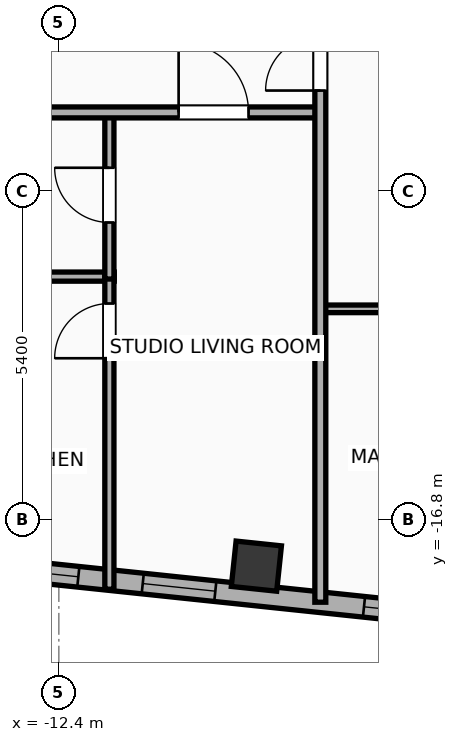
"""IFC4 building model, lengths in metres.
Left out: names, types, materials, properties, quantities, classifications, styles, units other than length and angle.
Written with IfcOpenShell. Run it as: python <this file> out.ifc"""

import sys

from ifc_helpers import new_model, si_unit, direction, frame, frame_2d, origin, origin_2d, place, context, subcontext, project, spatial, rectangle, hollow_rectangle, extrude, element, fill, save


model = new_model("IFC4")
c1 = context("Model", 3, precision=1e-05, world=origin(), true_north=direction((0.0, 1.0)))
c2 = subcontext(c1, "Body", "Model", "MODEL_VIEW")
j1 = project(units=[si_unit("LENGTHUNIT", "METRE"), si_unit("PLANEANGLEUNIT", "RADIAN")], contexts=[c1])
p1 = place(None, origin())
s1 = spatial("IfcSite", under=j1, at=p1, CompositionType="ELEMENT")
p2 = place(p1, origin())
s2 = spatial("IfcBuilding", under=s1, at=p2, CompositionType="ELEMENT")
p3 = place(p2, frame((0.0, 0.0, 271.7)))
s3 = spatial("IfcBuildingStorey", under=s2, at=p3, CompositionType="ELEMENT", Elevation=271.7)
p4 = place(p3, frame((-9.152, -17.561, 0.0), z_axis=(0.0, 0.0, 1.0), x_axis=(0.994521895368, -0.104528463268, 0.0)))
e1 = element("IfcColumn", 1, at=p4, inside=s3, PredefinedType="COLUMN", context=c2, shape_type="SweptSolid", body=[
    extrude(hollow_rectangle(XDim=0.75, YDim=0.75, WallThickness=0.025, at=origin_2d()), origin(), (0.0, 0.0, 1.0), 3.9),
])
p5 = place(p3, frame((18.708, -20.972, 0.0), z_axis=(0.0, 0.0, 1.0), x_axis=(-0.994521888554, 0.104528528102, 0.0)))
e2 = element("IfcWall", 2, at=p5, inside=s3, PredefinedType="ELEMENTEDWALL", context=c2, shape_type="SweptSolid", body=[
    extrude(rectangle(XDim=46.766, YDim=0.34, at=frame_2d((23.383, 0.0))), origin(), (0.0, 0.0, 1.0), 3.65),
])
p6 = place(p5, frame((23.833, 0.0, 0.75)))
e3 = element("IfcOpeningElement", 3, at=p6, cuts=e2, PredefinedType="OPENING", context=c2, shape_type="SweptSolid", body=[
    extrude(rectangle(XDim=2.4, YDim=2.1, at=frame_2d((1.2, 1.05))), frame((0.0, 0.18, 0.0), z_axis=(0.0, -1.0, 0.0), x_axis=(1.0, 0.0, 0.0)), (0.0, 0.0, 1.0), 0.36),
])
p7 = place(p5, frame((38.622, 0.0, 0.75)))
e4 = element("IfcOpeningElement", 4, at=p7, cuts=e2, PredefinedType="OPENING", context=c2, shape_type="SweptSolid", body=[
    extrude(rectangle(XDim=2.4, YDim=2.1, at=frame_2d((1.2, 1.05))), frame((0.0, 0.18, 0.0), z_axis=(0.0, -1.0, 0.0), x_axis=(1.0, 0.0, 0.0)), (0.0, 0.0, 1.0), 0.36),
])
p8 = place(p5, frame((44.402, 0.0, 0.75)))
e5 = element("IfcOpeningElement", 5, at=p8, cuts=e2, PredefinedType="OPENING", context=c2, shape_type="SweptSolid", body=[
    extrude(rectangle(XDim=1.2, YDim=2.05, at=frame_2d((0.6, 1.025))), frame((0.0, 0.18, 0.0), z_axis=(0.0, -1.0, 0.0), x_axis=(1.0, 0.0, 0.0)), (0.0, 0.0, 1.0), 0.36),
])
p9 = place(p5, frame((42.419, 0.0, 0.75)))
e6 = element("IfcOpeningElement", 6, at=p9, cuts=e2, PredefinedType="OPENING", context=c2, shape_type="SweptSolid", body=[
    extrude(rectangle(XDim=1.2, YDim=2.05, at=frame_2d((0.6, 1.025))), frame((0.0, 0.18, 0.0), z_axis=(0.0, -1.0, 0.0), x_axis=(1.0, 0.0, 0.0)), (0.0, 0.0, 1.0), 0.36),
])
p10 = place(p5, frame((34.933, 0.0, 0.75)))
e7 = element("IfcOpeningElement", 7, at=p10, cuts=e2, PredefinedType="OPENING", context=c2, shape_type="SweptSolid", body=[
    extrude(rectangle(XDim=1.2, YDim=2.05, at=frame_2d((0.6, 1.025))), frame((0.0, 0.18, 0.0), z_axis=(0.0, -1.0, 0.0), x_axis=(1.0, 0.0, 0.0)), (0.0, 0.0, 1.0), 0.36),
])
p11 = place(p5, frame((28.692, 0.0, 0.75)))
e8 = element("IfcOpeningElement", 8, at=p11, cuts=e2, PredefinedType="OPENING", context=c2, shape_type="SweptSolid", body=[
    extrude(rectangle(XDim=1.2, YDim=2.05, at=frame_2d((0.6, 1.025))), frame((0.0, 0.18, 0.0), z_axis=(0.0, -1.0, 0.0), x_axis=(1.0, 0.0, 0.0)), (0.0, 0.0, 1.0), 0.36),
])
p12 = place(p5, frame((30.957, 0.0, 0.75)))
e9 = element("IfcOpeningElement", 9, at=p12, cuts=e2, PredefinedType="OPENING", context=c2, shape_type="SweptSolid", body=[
    extrude(rectangle(XDim=1.2, YDim=2.05, at=frame_2d((0.6, 1.025))), frame((0.0, 0.18, 0.0), z_axis=(0.0, -1.0, 0.0), x_axis=(1.0, 0.0, 0.0)), (0.0, 0.0, 1.0), 0.36),
])
p13 = place(p5, frame((7.492, 0.0, 0.75)))
e10 = element("IfcOpeningElement", 10, at=p13, cuts=e2, PredefinedType="OPENING", context=c2, shape_type="SweptSolid", body=[
    extrude(rectangle(XDim=1.2, YDim=2.05, at=frame_2d((0.6, 1.025))), frame((0.0, 0.18, 0.0), z_axis=(0.0, -1.0, 0.0), x_axis=(1.0, 0.0, 0.0)), (0.0, 0.0, 1.0), 0.36),
])
p14 = place(p5, frame((4.141, 0.0, 0.75)))
e11 = element("IfcOpeningElement", 11, at=p14, cuts=e2, PredefinedType="OPENING", context=c2, shape_type="SweptSolid", body=[
    extrude(rectangle(XDim=1.2, YDim=2.05, at=frame_2d((0.6, 1.025))), frame((0.0, 0.18, 0.0), z_axis=(0.0, -1.0, 0.0), x_axis=(1.0, 0.0, 0.0)), (0.0, 0.0, 1.0), 0.36),
])
p15 = place(p5, frame((1.36, 0.0, 0.75)))
e12 = element("IfcOpeningElement", 12, at=p15, cuts=e2, PredefinedType="OPENING", context=c2, shape_type="SweptSolid", body=[
    extrude(rectangle(XDim=1.2, YDim=2.05, at=frame_2d((0.6, 1.025))), frame((0.0, 0.18, 0.0), z_axis=(0.0, -1.0, 0.0), x_axis=(1.0, 0.0, 0.0)), (0.0, 0.0, 1.0), 0.36),
])
p16 = place(p5, frame((20.254, 0.0, 0.75)))
e13 = element("IfcOpeningElement", 13, at=p16, cuts=e2, PredefinedType="OPENING", context=c2, shape_type="SweptSolid", body=[
    extrude(rectangle(XDim=1.2, YDim=2.05, at=frame_2d((0.6, 1.025))), frame((0.0, 0.18, 0.0), z_axis=(0.0, -1.0, 0.0), x_axis=(1.0, 0.0, 0.0)), (0.0, 0.0, 1.0), 0.36),
])
p17 = place(p5, frame((16.172, 0.0, 0.75)))
e14 = element("IfcOpeningElement", 14, at=p17, cuts=e2, PredefinedType="OPENING", context=c2, shape_type="SweptSolid", body=[
    extrude(rectangle(XDim=1.2, YDim=2.05, at=frame_2d((0.6, 1.025))), frame((0.0, 0.18, 0.0), z_axis=(0.0, -1.0, 0.0), x_axis=(1.0, 0.0, 0.0)), (0.0, 0.0, 1.0), 0.36),
])
p18 = place(p5, frame((12.11, 0.0, 0.75)))
e15 = element("IfcOpeningElement", 15, at=p18, cuts=e2, PredefinedType="OPENING", context=c2, shape_type="SweptSolid", body=[
    extrude(rectangle(XDim=1.2, YDim=2.05, at=frame_2d((0.6, 1.025))), frame((0.0, 0.18, 0.0), z_axis=(0.0, -1.0, 0.0), x_axis=(1.0, 0.0, 0.0)), (0.0, 0.0, 1.0), 0.36),
])
p19 = place(p3, frame((-14.039, -12.8, 0.0), z_axis=(0.0, 0.0, 1.0), x_axis=(1.0, 0.0, 0.0)))
e16 = element("IfcWall", 16, at=p19, inside=s3, PredefinedType="PLUMBINGWALL", context=c2, shape_type="SweptSolid", body=[
    extrude(rectangle(XDim=2.55, YDim=0.15, at=frame_2d((1.275, 0.0))), origin(), (0.0, 0.0, 1.0), 3.65),
])
p20 = place(p3, frame((-11.569, -17.941, 0.0), z_axis=(0.0, 0.0, 1.0), x_axis=(0.0, 1.0, 0.0)))
e17 = element("IfcWall", 17, at=p20, inside=s3, PredefinedType="PLUMBINGWALL", context=c2, shape_type="SweptSolid", body=[
    extrude(rectangle(XDim=5.181, YDim=0.15, at=frame_2d((2.59, 0.0))), origin(), (0.0, 0.0, 1.0), 3.65),
])
p21 = place(p20, frame((3.798, 0.0, 0.0)))
e18 = element("IfcOpeningElement", 18, at=p21, cuts=e17, PredefinedType="OPENING", context=c2, shape_type="SweptSolid", body=[
    extrude(rectangle(XDim=0.9, YDim=2.05, at=frame_2d((0.45, 1.025))), frame((0.0, 0.085, 0.0), z_axis=(0.0, -1.0, 0.0), x_axis=(1.0, 0.0, 0.0)), (0.0, 0.0, 1.0), 0.17),
])
p22 = place(p3, frame((-11.569, -12.84, 0.0), z_axis=(0.0, 0.0, 1.0), x_axis=(0.0, 1.0, 0.0)))
e19 = element("IfcWall", 19, at=p22, inside=s3, PredefinedType="PLUMBINGWALL", context=c2, shape_type="SweptSolid", body=[
    extrude(rectangle(XDim=2.76, YDim=0.15, at=frame_2d((1.38, 0.0))), origin(), (0.0, 0.0, 1.0), 3.09),
])
p23 = place(p22, frame((0.93, 0.0, 0.0)))
e20 = element("IfcOpeningElement", 20, at=p23, cuts=e19, PredefinedType="OPENING", context=c2, shape_type="SweptSolid", body=[
    extrude(rectangle(XDim=0.9, YDim=2.05, at=frame_2d((0.45, 1.025))), frame((0.0, 0.085, 0.0), z_axis=(0.0, -1.0, 0.0), x_axis=(1.0, 0.0, 0.0)), (0.0, 0.0, 1.0), 0.17),
])
p24 = place(p3, frame((-30.639, -10.1, 0.0), z_axis=(0.0, 0.0, 1.0), x_axis=(1.0, 0.0, 0.0)))
e21 = element("IfcWall", 21, at=p24, inside=s3, PredefinedType="PARTITIONING", context=c2, shape_type="SweptSolid", body=[
    extrude(rectangle(XDim=22.559, YDim=0.18, at=frame_2d((11.28, 0.0))), origin(), (0.0, 0.0, 1.0), 3.65),
])
p25 = place(p24, frame((2.298, 0.0, 0.0)))
e22 = element("IfcOpeningElement", 22, at=p25, cuts=e21, PredefinedType="OPENING", context=c2, shape_type="SweptSolid", body=[
    extrude(rectangle(XDim=0.9, YDim=2.05, at=frame_2d((0.45, 1.025))), frame((0.0, 0.1, 0.0), z_axis=(0.0, -1.0, 0.0), x_axis=(1.0, 0.0, 0.0)), (0.0, 0.0, 1.0), 0.2),
])
p26 = place(p24, frame((8.812, 0.0, 0.0)))
e23 = element("IfcOpeningElement", 23, at=p26, cuts=e21, PredefinedType="OPENING", context=c2, shape_type="SweptSolid", body=[
    extrude(rectangle(XDim=1.15, YDim=2.05, at=frame_2d((0.575, 1.025))), frame((0.0, 0.1, 0.0), z_axis=(0.0, -1.0, 0.0), x_axis=(1.0, 0.0, 0.0)), (0.0, 0.0, 1.0), 0.2),
])
p27 = place(p24, frame((13.738, 0.0, 0.0)))
e24 = element("IfcOpeningElement", 24, at=p27, cuts=e21, PredefinedType="OPENING", context=c2, shape_type="SweptSolid", body=[
    extrude(rectangle(XDim=0.9, YDim=2.05, at=frame_2d((0.45, 1.025))), frame((0.0, 0.1, 0.0), z_axis=(0.0, -1.0, 0.0), x_axis=(1.0, 0.0, 0.0)), (0.0, 0.0, 1.0), 0.2),
])
p28 = place(p24, frame((20.209, 0.0, 0.0)))
e25 = element("IfcOpeningElement", 25, at=p28, cuts=e21, PredefinedType="OPENING", context=c2, shape_type="SweptSolid", body=[
    extrude(rectangle(XDim=1.15, YDim=2.05, at=frame_2d((0.575, 1.025))), frame((0.0, 0.1, 0.0), z_axis=(0.0, -1.0, 0.0), x_axis=(1.0, 0.0, 0.0)), (0.0, 0.0, 1.0), 0.2),
])
p29 = place(p3, frame((-8.08, -13.33, 0.0), z_axis=(0.0, 0.0, 1.0), x_axis=(1.0, 0.0, 0.0)))
e26 = element("IfcWall", 26, at=p29, inside=s3, PredefinedType="PARTITIONING", context=c2, shape_type="SweptSolid", body=[
    extrude(rectangle(XDim=8.06, YDim=0.125, at=frame_2d((4.03, 0.0))), origin(), (0.0, 0.0, 1.0), 3.65),
])
p30 = place(p29, frame((1.323, 0.0, 0.0)))
e27 = element("IfcOpeningElement", 27, at=p30, cuts=e26, PredefinedType="OPENING", context=c2, shape_type="SweptSolid", body=[
    extrude(rectangle(XDim=0.9, YDim=2.05, at=frame_2d((0.45, 1.025))), frame((0.0, 0.073, 0.0), z_axis=(0.0, -1.0, 0.0), x_axis=(1.0, 0.0, 0.0)), (0.0, 0.0, 1.0), 0.145),
])
p31 = place(p29, frame((4.547, 0.0, 0.0)))
e28 = element("IfcOpeningElement", 28, at=p31, cuts=e26, PredefinedType="OPENING", context=c2, shape_type="SweptSolid", body=[
    extrude(rectangle(XDim=0.9, YDim=2.05, at=frame_2d((0.45, 1.025))), frame((0.0, 0.073, 0.0), z_axis=(0.0, -1.0, 0.0), x_axis=(1.0, 0.0, 0.0)), (0.0, 0.0, 1.0), 0.145),
])
p32 = place(p3, frame((-8.1, -18.155, 0.0), z_axis=(0.0, 0.0, 1.0), x_axis=(0.0, 1.0, 0.0)))
e29 = element("IfcWall", 29, at=p32, inside=s3, PredefinedType="PARTITIONING", context=c2, shape_type="SweptSolid", body=[
    extrude(rectangle(XDim=9.665, YDim=0.18, at=frame_2d((4.832, 0.0))), origin(), (0.0, 0.0, 1.0), 3.65),
])
p33 = place(p32, frame((8.414, 0.0, 0.0)))
e30 = element("IfcOpeningElement", 30, at=p33, cuts=e29, PredefinedType="OPENING", context=c2, shape_type="SweptSolid", body=[
    extrude(rectangle(XDim=0.9, YDim=2.05, at=frame_2d((0.45, 1.025))), frame((0.0, 0.1, 0.0), z_axis=(0.0, -1.0, 0.0), x_axis=(1.0, 0.0, 0.0)), (0.0, 0.0, 1.0), 0.2),
])
p34 = place(p6, origin())
e31 = element("IfcWindow", 31, at=p34, inside=s3, PartitioningType="SINGLE_PANEL", PredefinedType="WINDOW", context=c2, shape_type="SweptSolid", body=[
    extrude(rectangle(XDim=2.4, YDim=2.1, at=frame_2d((1.2, 1.05))), frame((0.0, 0.03, 0.0), z_axis=(0.0, -1.0, 0.0), x_axis=(1.0, 0.0, 0.0)), (0.0, 0.0, 1.0), 0.06),
])
fill(e3, e31)
p35 = place(p11, origin())
e32 = element("IfcWindow", 32, at=p35, inside=s3, PartitioningType="SINGLE_PANEL", PredefinedType="WINDOW", context=c2, shape_type="SweptSolid", body=[
    extrude(rectangle(XDim=1.2, YDim=2.05, at=frame_2d((0.6, 1.025))), frame((0.0, 0.03, 0.0), z_axis=(0.0, -1.0, 0.0), x_axis=(1.0, 0.0, 0.0)), (0.0, 0.0, 1.0), 0.06),
])
fill(e8, e32)
p36 = place(p12, origin())
e33 = element("IfcWindow", 33, at=p36, inside=s3, PartitioningType="SINGLE_PANEL", PredefinedType="WINDOW", context=c2, shape_type="SweptSolid", body=[
    extrude(rectangle(XDim=1.2, YDim=2.05, at=frame_2d((0.6, 1.025))), frame((0.0, 0.03, 0.0), z_axis=(0.0, -1.0, 0.0), x_axis=(1.0, 0.0, 0.0)), (0.0, 0.0, 1.0), 0.06),
])
fill(e9, e33)
p37 = place(p21, origin())
e34 = element("IfcDoor", 34, at=p37, inside=s3, OperationType="SINGLE_SWING_LEFT", PredefinedType="DOOR", context=c2, shape_type="SweptSolid", body=[
    extrude(rectangle(XDim=0.9, YDim=2.05, at=frame_2d((0.45, 1.025))), frame((0.0, 0.025, 0.0), z_axis=(0.0, -1.0, 0.0), x_axis=(1.0, 0.0, 0.0)), (0.0, 0.0, 1.0), 0.05),
])
fill(e18, e34)
p38 = place(p23, origin())
e35 = element("IfcDoor", 35, at=p38, inside=s3, OperationType="SINGLE_SWING_RIGHT", PredefinedType="DOOR", context=c2, shape_type="SweptSolid", body=[
    extrude(rectangle(XDim=0.9, YDim=2.05, at=frame_2d((0.45, 1.025))), frame((0.0, 0.025, 0.0), z_axis=(0.0, -1.0, 0.0), x_axis=(1.0, 0.0, 0.0)), (0.0, 0.0, 1.0), 0.05),
])
fill(e20, e35)
p39 = place(p28, origin())
e36 = element("IfcDoor", 36, at=p39, inside=s3, OperationType="SINGLE_SWING_LEFT", PredefinedType="DOOR", context=c2, shape_type="SweptSolid", body=[
    extrude(rectangle(XDim=1.15, YDim=2.05, at=frame_2d((0.575, 1.025))), frame((0.0, 0.025, 0.0), z_axis=(0.0, -1.0, 0.0), x_axis=(1.0, 0.0, 0.0)), (0.0, 0.0, 1.0), 0.05),
])
fill(e25, e36)
p40 = place(p33, origin())
e37 = element("IfcDoor", 37, at=p40, inside=s3, OperationType="SINGLE_SWING_LEFT", PredefinedType="DOOR", context=c2, shape_type="SweptSolid", body=[
    extrude(rectangle(XDim=0.9, YDim=2.05, at=frame_2d((0.45, 1.025))), frame((0.0, 0.025, 0.0), z_axis=(0.0, -1.0, 0.0), x_axis=(1.0, 0.0, 0.0)), (0.0, 0.0, 1.0), 0.05),
])
fill(e30, e37)
save(model, sys.argv[1])
